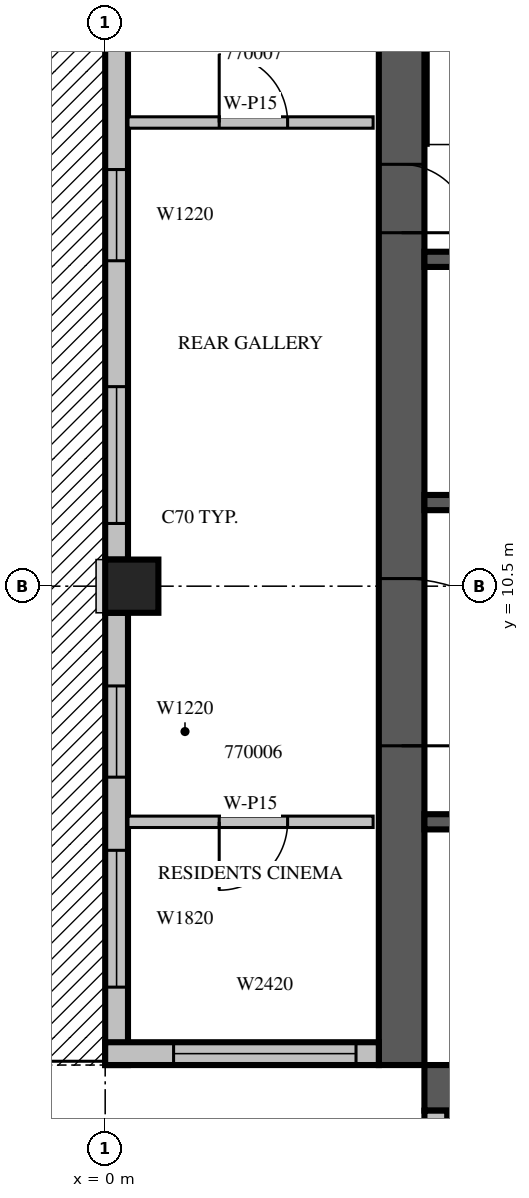
"""IFC4 building model, lengths in metres.
Left out: names, types, materials, properties, quantities, classifications, styles, units other than length and angle.
Written with IfcOpenShell. Run it as: python <this file> out.ifc"""

import sys

from ifc_helpers import new_model, si_unit, direction, frame, frame_2d, origin, origin_2d, place, context, subcontext, project, spatial, rectangle, extrude, source, transform, mapped, element, fill, save


model = new_model("IFC4")
c1 = context("Model", 3, precision=1e-05, world=origin(), true_north=direction((0.0, 1.0)))
c2 = subcontext(c1, "Body", "Model", "MODEL_VIEW")
j1 = project(units=[si_unit("LENGTHUNIT", "METRE"), si_unit("PLANEANGLEUNIT", "RADIAN")], contexts=[c1])
p1 = place(None, origin())
s1 = spatial("IfcSite", under=j1, at=p1, CompositionType="ELEMENT")
p2 = place(p1, origin())
s2 = spatial("IfcBuilding", under=s1, at=p2, CompositionType="ELEMENT")
p3 = place(p2, frame((0.0, 0.0, 305.5)))
s3 = spatial("IfcBuildingStorey", under=s2, at=p3, CompositionType="ELEMENT", Elevation=305.5)
m1 = source(origin(), c2, "Body", "SweptSolid", [
    extrude(rectangle(XDim=0.7, YDim=0.7, at=origin_2d()), origin(), (0.0, 0.0, 1.0), 3.5),
])
p4 = place(p3, frame((0.35, 10.5, 0.0), z_axis=(0.0, 0.0, 1.0), x_axis=(1.0, 0.0, 0.0)))
e1 = element("IfcColumn", 1, at=p4, inside=s3, PredefinedType="COLUMN", context=c2, shape_type="MappedRepresentation", body=[
    mapped(m1, transform((0.0, 0.0, 0.0), scale=1.0)),
])
m2 = source(origin(), c2, "Body", "SweptSolid", [
    extrude(rectangle(XDim=17.4, YDim=0.6, at=frame_2d((8.7, 0.0))), origin(), (0.0, 0.0, 1.0), 3.5),
])
p5 = place(p3, frame((3.9, 4.2, 0.0), z_axis=(0.0, 0.0, 1.0), x_axis=(0.0, 1.0, 0.0)))
e2 = element("IfcWall", 2, at=p5, inside=s3, PredefinedType="SHEAR", context=c2, shape_type="MappedRepresentation", body=[
    mapped(m2, transform((0.0, 0.0, 0.0), scale=1.0)),
])
m3 = source(origin(), c2, "Body", "SweptSolid", [
    extrude(rectangle(XDim=2.2, YDim=2.1, at=frame_2d((1.1, 1.05))), frame((0.0, 0.31, 0.0), z_axis=(0.0, -1.0, 0.0), x_axis=(1.0, 0.0, 0.0)), (0.0, 0.0, 1.0), 0.62),
])
p6 = place(p5, frame((4.2, 0.0, 0.0)))
e3 = element("IfcOpeningElement", 3, at=p6, cuts=e2, PredefinedType="OPENING", context=c2, shape_type="MappedRepresentation", body=[
    mapped(m3, transform((0.0, 0.0, 0.0), scale=1.0)),
])
m4 = source(origin(), c2, "Body", "SweptSolid", [
    extrude(rectangle(XDim=0.9, YDim=2.1, at=frame_2d((0.45, 1.05))), frame((0.0, 0.31, 0.0), z_axis=(0.0, -1.0, 0.0), x_axis=(1.0, 0.0, 0.0)), (0.0, 0.0, 1.0), 0.62),
])
p7 = place(p5, frame((10.95, 0.0, 0.0)))
e4 = element("IfcOpeningElement", 4, at=p7, cuts=e2, PredefinedType="OPENING", context=c2, shape_type="MappedRepresentation", body=[
    mapped(m4, transform((0.0, 0.0, 0.0), scale=1.0)),
])
p8 = place(p3, frame((4.2, 3.9, 0.0), z_axis=(0.0, 0.0, 1.0), x_axis=(1.0, 0.0, 0.0)))
e5 = element("IfcWall", 5, at=p8, inside=s3, PredefinedType="SHEAR", context=c2, shape_type="MappedRepresentation", body=[
    mapped(m2, transform((0.0, 0.0, 0.0), scale=1.0)),
])
p9 = place(p8, frame((12.8, 0.0, 0.0)))
e6 = element("IfcOpeningElement", 6, at=p9, cuts=e5, PredefinedType="OPENING", context=c2, shape_type="MappedRepresentation", body=[
    mapped(m4, transform((0.0, 0.0, 0.0), scale=1.0)),
])
m5 = source(origin(), c2, "Body", "SweptSolid", [
    extrude(rectangle(XDim=7.0, YDim=0.3, at=frame_2d((3.5, 0.0))), origin(), (0.0, 0.0, 1.0), 3.1),
])
p10 = place(p3, frame((0.15, 17.85, 0.0), z_axis=(0.0, 0.0, 1.0), x_axis=(0.0, -1.0, 0.0)))
e7 = element("IfcWall", 7, at=p10, inside=s3, PredefinedType="STANDARD", context=c2, shape_type="MappedRepresentation", body=[
    mapped(m5, transform((0.0, 0.0, 0.0), scale=1.0)),
])
m6 = source(origin(), c2, "Body", "SweptSolid", [
    extrude(rectangle(XDim=1.8, YDim=2.4, at=frame_2d((0.9, 1.2))), frame((0.0, 0.16, 0.0), z_axis=(0.0, -1.0, 0.0), x_axis=(1.0, 0.0, 0.0)), (0.0, 0.0, 1.0), 0.32),
])
p11 = place(p10, frame((4.725, 0.0, 0.0)))
e8 = element("IfcOpeningElement", 8, at=p11, cuts=e7, PredefinedType="OPENING", context=c2, shape_type="MappedRepresentation", body=[
    mapped(m6, transform((0.0, 0.0, 0.0), scale=1.0)),
])
m7 = source(origin(), c2, "Body", "SweptSolid", [
    extrude(rectangle(XDim=1.2, YDim=2.0, at=frame_2d((0.6, 1.0))), frame((0.0, 0.16, 0.0), z_axis=(0.0, -1.0, 0.0), x_axis=(1.0, 0.0, 0.0)), (0.0, 0.0, 1.0), 0.32),
])
p12 = place(p10, frame((1.869, 0.0, 0.6)))
e9 = element("IfcOpeningElement", 9, at=p12, cuts=e7, PredefinedType="OPENING", context=c2, shape_type="MappedRepresentation", body=[
    mapped(m7, transform((0.0, 0.0, 0.0), scale=1.0)),
])
m8 = source(origin(), c2, "Body", "SweptSolid", [
    extrude(rectangle(XDim=5.95, YDim=0.3, at=frame_2d((2.975, 0.0))), origin(), (0.0, 0.0, 1.0), 3.1),
])
p13 = place(p3, frame((0.15, 10.15, 0.0), z_axis=(0.0, 0.0, 1.0), x_axis=(0.0, -1.0, 0.0)))
e10 = element("IfcWall", 10, at=p13, inside=s3, PredefinedType="STANDARD", context=c2, shape_type="MappedRepresentation", body=[
    mapped(m8, transform((0.0, 0.0, 0.0), scale=1.0)),
])
m9 = source(origin(), c2, "Body", "SweptSolid", [
    extrude(rectangle(XDim=1.8, YDim=2.0, at=frame_2d((0.9, 1.0))), frame((0.0, 0.16, 0.0), z_axis=(0.0, -1.0, 0.0), x_axis=(1.0, 0.0, 0.0)), (0.0, 0.0, 1.0), 0.32),
])
p14 = place(p13, frame((3.125, 0.0, 0.6)))
e11 = element("IfcOpeningElement", 11, at=p14, cuts=e10, PredefinedType="OPENING", context=c2, shape_type="MappedRepresentation", body=[
    mapped(m9, transform((0.0, 0.0, 0.0), scale=1.0)),
])
p15 = place(p13, frame((0.963, 0.0, 0.6)))
e12 = element("IfcOpeningElement", 12, at=p15, cuts=e10, PredefinedType="OPENING", context=c2, shape_type="MappedRepresentation", body=[
    mapped(m7, transform((0.0, 0.0, 0.0), scale=1.0)),
])
m10 = source(origin(), c2, "Body", "SweptSolid", [
    extrude(rectangle(XDim=3.6, YDim=0.3, at=frame_2d((1.8, 0.0))), origin(), (0.0, 0.0, 1.0), 3.1),
])
p16 = place(p3, frame((0.0, 4.35, 0.0), z_axis=(0.0, 0.0, 1.0), x_axis=(1.0, 0.0, 0.0)))
e13 = element("IfcWall", 13, at=p16, inside=s3, PredefinedType="STANDARD", context=c2, shape_type="MappedRepresentation", body=[
    mapped(m10, transform((0.0, 0.0, 0.0), scale=1.0)),
])
m11 = source(origin(), c2, "Body", "SweptSolid", [
    extrude(rectangle(XDim=2.4, YDim=2.0, at=frame_2d((1.2, 1.0))), frame((0.0, 0.16, 0.0), z_axis=(0.0, -1.0, 0.0), x_axis=(1.0, 0.0, 0.0)), (0.0, 0.0, 1.0), 0.32),
])
p17 = place(p16, frame((0.9, 0.0, 0.6)))
e14 = element("IfcOpeningElement", 14, at=p17, cuts=e13, PredefinedType="OPENING", context=c2, shape_type="MappedRepresentation", body=[
    mapped(m11, transform((0.0, 0.0, 0.0), scale=1.0)),
])
p18 = place(p3, frame((4.35, 3.6, 0.0), z_axis=(0.0, 0.0, 1.0), x_axis=(0.0, -1.0, 0.0)))
e15 = element("IfcWall", 15, at=p18, inside=s3, PredefinedType="STANDARD", context=c2, shape_type="MappedRepresentation", body=[
    mapped(m10, transform((0.0, 0.0, 0.0), scale=1.0)),
])
p19 = place(p18, frame((0.3, 0.0, 0.6)))
e16 = element("IfcOpeningElement", 16, at=p19, cuts=e15, PredefinedType="OPENING", context=c2, shape_type="MappedRepresentation", body=[
    mapped(m11, transform((0.0, 0.0, 0.0), scale=1.0)),
])
m12 = source(origin(), c2, "Body", "SweptSolid", [
    extrude(rectangle(XDim=9.6, YDim=0.2, at=frame_2d((4.8, 0.0))), origin(), (0.0, 0.0, 1.0), 3.5),
])
p20 = place(p3, frame((4.2, 7.4, 0.0), z_axis=(0.0, 0.0, 1.0), x_axis=(1.0, 0.0, 0.0)))
e17 = element("IfcWall", 17, at=p20, inside=s3, PredefinedType="SOLIDWALL", context=c2, shape_type="MappedRepresentation", body=[
    mapped(m12, transform((0.0, 0.0, 0.0), scale=1.0)),
])
m13 = source(origin(), c2, "Body", "SweptSolid", [
    extrude(rectangle(XDim=1.1, YDim=2.1, at=frame_2d((0.55, 1.05))), frame((0.0, 0.11, 0.0), z_axis=(0.0, -1.0, 0.0), x_axis=(1.0, 0.0, 0.0)), (0.0, 0.0, 1.0), 0.22),
])
p21 = place(p20, frame((0.65, 0.0, 0.0)))
e18 = element("IfcOpeningElement", 18, at=p21, cuts=e17, PredefinedType="OPENING", context=c2, shape_type="MappedRepresentation", body=[
    mapped(m13, transform((0.0, 0.0, 0.0), scale=1.0)),
])
p22 = place(p20, frame((3.05, 0.0, 0.0)))
e19 = element("IfcOpeningElement", 19, at=p22, cuts=e17, PredefinedType="OPENING", context=c2, shape_type="MappedRepresentation", body=[
    mapped(m13, transform((0.0, 0.0, 0.0), scale=1.0)),
])
p23 = place(p20, frame((5.45, 0.0, 0.0)))
e20 = element("IfcOpeningElement", 20, at=p23, cuts=e17, PredefinedType="OPENING", context=c2, shape_type="MappedRepresentation", body=[
    mapped(m13, transform((0.0, 0.0, 0.0), scale=1.0)),
])
p24 = place(p20, frame((7.85, 0.0, 0.0)))
e21 = element("IfcOpeningElement", 21, at=p24, cuts=e17, PredefinedType="OPENING", context=c2, shape_type="MappedRepresentation", body=[
    mapped(m13, transform((0.0, 0.0, 0.0), scale=1.0)),
])
m14 = source(origin(), c2, "Body", "SweptSolid", [
    extrude(rectangle(XDim=4.8, YDim=0.2, at=frame_2d((2.4, 0.0))), origin(), (0.0, 0.0, 1.0), 3.5),
])
p25 = place(p3, frame((4.2, 11.6, 0.0), z_axis=(0.0, 0.0, 1.0), x_axis=(1.0, 0.0, 0.0)))
e22 = element("IfcWall", 22, at=p25, inside=s3, PredefinedType="SOLIDWALL", context=c2, shape_type="MappedRepresentation", body=[
    mapped(m14, transform((0.0, 0.0, 0.0), scale=1.0)),
])
p26 = place(p25, frame((0.65, 0.0, 0.0)))
e23 = element("IfcOpeningElement", 23, at=p26, cuts=e22, PredefinedType="OPENING", context=c2, shape_type="MappedRepresentation", body=[
    mapped(m13, transform((0.0, 0.0, 0.0), scale=1.0)),
])
p27 = place(p25, frame((3.05, 0.0, 0.0)))
e24 = element("IfcOpeningElement", 24, at=p27, cuts=e22, PredefinedType="OPENING", context=c2, shape_type="MappedRepresentation", body=[
    mapped(m13, transform((0.0, 0.0, 0.0), scale=1.0)),
])
p28 = place(p3, frame((4.2, 14.8, 0.0), z_axis=(0.0, 0.0, 1.0), x_axis=(1.0, 0.0, 0.0)))
e25 = element("IfcWall", 25, at=p28, inside=s3, PredefinedType="SOLIDWALL", context=c2, shape_type="MappedRepresentation", body=[
    mapped(m14, transform((0.0, 0.0, 0.0), scale=1.0)),
])
m15 = source(origin(), c2, "Body", "SweptSolid", [
    extrude(rectangle(XDim=3.225, YDim=0.15, at=frame_2d((1.613, 0.0))), origin(), (0.0, 0.0, 1.0), 3.1),
])
p29 = place(p3, frame((0.3, 7.4, 0.0), z_axis=(0.0, 0.0, 1.0), x_axis=(1.0, 0.0, 0.0)))
e26 = element("IfcWall", 26, at=p29, inside=s3, PredefinedType="PARTITIONING", context=c2, shape_type="MappedRepresentation", body=[
    mapped(m15, transform((0.0, 0.0, 0.0), scale=1.0)),
])
m16 = source(origin(), c2, "Body", "SweptSolid", [
    extrude(rectangle(XDim=0.9, YDim=2.1, at=frame_2d((0.45, 1.05))), frame((0.0, 0.085, 0.0), z_axis=(0.0, -1.0, 0.0), x_axis=(1.0, 0.0, 0.0)), (0.0, 0.0, 1.0), 0.17),
])
p30 = place(p29, frame((1.2, 0.0, 0.0)))
e27 = element("IfcOpeningElement", 27, at=p30, cuts=e26, PredefinedType="OPENING", context=c2, shape_type="MappedRepresentation", body=[
    mapped(m16, transform((0.0, 0.0, 0.0), scale=1.0)),
])
p31 = place(p3, frame((0.3, 16.6, 0.0), z_axis=(0.0, 0.0, 1.0), x_axis=(1.0, 0.0, 0.0)))
e28 = element("IfcWall", 28, at=p31, inside=s3, PredefinedType="PARTITIONING", context=c2, shape_type="MappedRepresentation", body=[
    mapped(m15, transform((0.0, 0.0, 0.0), scale=1.0)),
])
p32 = place(p31, frame((1.2, 0.0, 0.0)))
e29 = element("IfcOpeningElement", 29, at=p32, cuts=e28, PredefinedType="OPENING", context=c2, shape_type="MappedRepresentation", body=[
    mapped(m16, transform((0.0, 0.0, 0.0), scale=1.0)),
])
m17 = source(origin(), c2, "Body", "SweptSolid", [
    extrude(rectangle(XDim=1.8, YDim=2.4, at=frame_2d((0.9, 1.2))), frame((0.0, 0.025, 0.0), z_axis=(0.0, -1.0, 0.0), x_axis=(1.0, 0.0, 0.0)), (0.0, 0.0, 1.0), 0.05),
])
p33 = place(p11, origin())
e30 = element("IfcDoor", 30, at=p33, inside=s3, OperationType="SLIDING_TO_LEFT", PredefinedType="DOOR", context=c2, shape_type="MappedRepresentation", body=[
    mapped(m17, transform((0.0, 0.0, 0.0), scale=1.0)),
])
fill(e8, e30)
m18 = source(origin(), c2, "Body", "SweptSolid", [
    extrude(rectangle(XDim=1.8, YDim=2.0, at=frame_2d((0.9, 1.0))), frame((0.0, 0.03, 0.0), z_axis=(0.0, -1.0, 0.0), x_axis=(1.0, 0.0, 0.0)), (0.0, 0.0, 1.0), 0.06),
])
p34 = place(p14, origin())
e31 = element("IfcWindow", 31, at=p34, inside=s3, PartitioningType="SINGLE_PANEL", PredefinedType="WINDOW", context=c2, shape_type="MappedRepresentation", body=[
    mapped(m18, transform((0.0, 0.0, 0.0), scale=1.0)),
])
fill(e11, e31)
m19 = source(origin(), c2, "Body", "SweptSolid", [
    extrude(rectangle(XDim=1.2, YDim=2.0, at=frame_2d((0.6, 1.0))), frame((0.0, 0.03, 0.0), z_axis=(0.0, -1.0, 0.0), x_axis=(1.0, 0.0, 0.0)), (0.0, 0.0, 1.0), 0.06),
])
p35 = place(p12, origin())
e32 = element("IfcWindow", 32, at=p35, inside=s3, PartitioningType="SINGLE_PANEL", PredefinedType="WINDOW", context=c2, shape_type="MappedRepresentation", body=[
    mapped(m19, transform((0.0, 0.0, 0.0), scale=1.0)),
])
fill(e9, e32)
p36 = place(p15, origin())
e33 = element("IfcWindow", 33, at=p36, inside=s3, PartitioningType="SINGLE_PANEL", PredefinedType="WINDOW", context=c2, shape_type="MappedRepresentation", body=[
    mapped(m19, transform((0.0, 0.0, 0.0), scale=1.0)),
])
fill(e12, e33)
m20 = source(origin(), c2, "Body", "SweptSolid", [
    extrude(rectangle(XDim=2.4, YDim=2.0, at=frame_2d((1.2, 1.0))), frame((0.0, 0.03, 0.0), z_axis=(0.0, -1.0, 0.0), x_axis=(1.0, 0.0, 0.0)), (0.0, 0.0, 1.0), 0.06),
])
p37 = place(p17, origin())
e34 = element("IfcWindow", 34, at=p37, inside=s3, PartitioningType="SINGLE_PANEL", PredefinedType="WINDOW", context=c2, shape_type="MappedRepresentation", body=[
    mapped(m20, transform((0.0, 0.0, 0.0), scale=1.0)),
])
fill(e14, e34)
m21 = source(origin(), c2, "Body", "SweptSolid", [
    extrude(rectangle(XDim=2.2, YDim=2.1, at=frame_2d((1.1, 1.05))), frame((0.0, 0.025, 0.0), z_axis=(0.0, -1.0, 0.0), x_axis=(1.0, 0.0, 0.0)), (0.0, 0.0, 1.0), 0.05),
])
p38 = place(p6, origin())
e35 = element("IfcDoor", 35, at=p38, inside=s3, OperationType="DOUBLE_DOOR_SINGLE_SWING", PredefinedType="DOOR", context=c2, shape_type="MappedRepresentation", body=[
    mapped(m21, transform((0.0, 0.0, 0.0), scale=1.0)),
])
fill(e3, e35)
m22 = source(origin(), c2, "Body", "SweptSolid", [
    extrude(rectangle(XDim=0.9, YDim=2.1, at=frame_2d((0.45, 1.05))), frame((0.0, 0.025, 0.0), z_axis=(0.0, -1.0, 0.0), x_axis=(1.0, 0.0, 0.0)), (0.0, 0.0, 1.0), 0.05),
])
p39 = place(p7, origin())
e36 = element("IfcDoor", 36, at=p39, inside=s3, OperationType="SINGLE_SWING_RIGHT", PredefinedType="DOOR", context=c2, shape_type="MappedRepresentation", body=[
    mapped(m22, transform((0.0, 0.0, 0.0), scale=1.0)),
])
fill(e4, e36)
p40 = place(p30, origin())
e37 = element("IfcDoor", 37, at=p40, inside=s3, OperationType="SINGLE_SWING_RIGHT", PredefinedType="DOOR", context=c2, shape_type="MappedRepresentation", body=[
    mapped(m22, transform((0.0, 0.0, 0.0), scale=1.0)),
])
fill(e27, e37)
p41 = place(p32, origin())
e38 = element("IfcDoor", 38, at=p41, inside=s3, OperationType="SINGLE_SWING_LEFT", PredefinedType="DOOR", context=c2, shape_type="MappedRepresentation", body=[
    mapped(m22, transform((0.0, 0.0, 0.0), scale=1.0)),
])
fill(e29, e38)
save(model, sys.argv[1])
